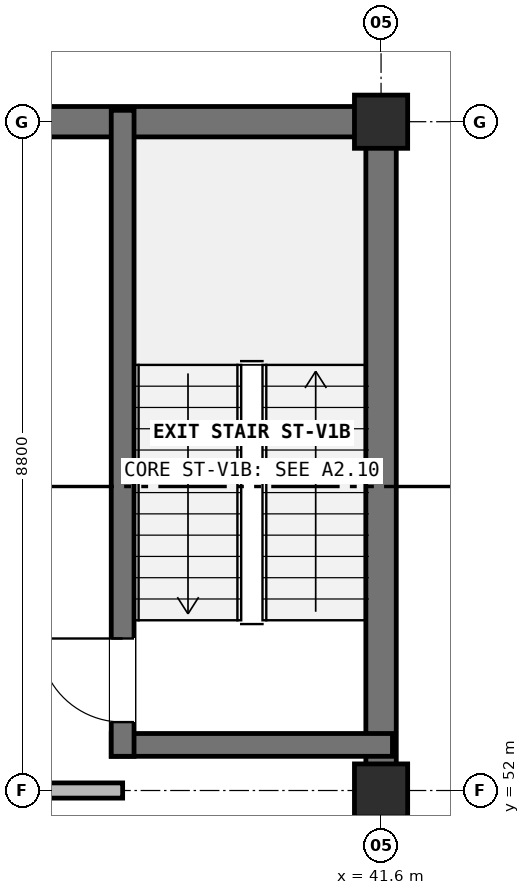
"""IFC4 building model, lengths in metres.
Left out: names, types, materials, properties, quantities, classifications, styles, units other than length and angle.
Written with IfcOpenShell. Run it as: python <this file> out.ifc"""

import sys

from ifc_helpers import new_model, si_unit, direction, frame, frame_2d, origin, origin_2d, place, context, subcontext, project, spatial, rectangle, extrude, element, fill, save


model = new_model("IFC4")
c1 = context("Model", 3, precision=1e-05, world=origin(), true_north=direction((0.0, 1.0)))
c2 = subcontext(c1, "Body", "Model", "MODEL_VIEW")
j1 = project(units=[si_unit("LENGTHUNIT", "METRE"), si_unit("PLANEANGLEUNIT", "RADIAN")], contexts=[c1])
p1 = place(None, origin())
s1 = spatial("IfcSite", under=j1, at=p1, CompositionType="ELEMENT")
p2 = place(p1, origin())
s2 = spatial("IfcBuilding", under=s1, at=p2, CompositionType="ELEMENT")
p3 = place(p2, frame((0.0, 0.0, -4.5)))
s3 = spatial("IfcBuildingStorey", under=s2, at=p3, CompositionType="ELEMENT", Elevation=-4.5)
for number, where, z_axis, x_axis in (
    (1, (41.6, 52.0, 0.0), (0.0, 0.0, 1.0), (1.0, 0.0, 0.0)),
    (2, (41.6, 60.8, 0.0), (0.0, 0.0, 1.0), (1.0, 0.0, 0.0)),
):
    element("IfcColumn", number, at=place(p3, frame(where, z_axis=z_axis, x_axis=x_axis)), inside=s3, PredefinedType="COLUMN", context=c2, shape_type="SweptSolid", body=[
        extrude(rectangle(XDim=0.7, YDim=0.7, at=origin_2d()), origin(), (0.0, 0.0, 1.0), 4.5),
    ])
p4 = place(p3, frame((41.6, 16.6, 0.0), z_axis=(0.0, 0.0, 1.0), x_axis=(0.0, 1.0, 0.0)))
e3 = element("IfcWall", 3, at=p4, inside=s3, PredefinedType="USERDEFINED", context=c2, shape_type="SweptSolid", body=[
    extrude(rectangle(XDim=44.4, YDim=0.4, at=frame_2d((22.2, 0.0))), origin(), (0.0, 0.0, 1.0), 4.5),
])
p5 = place(p3, frame((41.8, 60.8, 0.0), z_axis=(0.0, 0.0, 1.0), x_axis=(-1.0, 0.0, 0.0)))
e4 = element("IfcWall", 4, at=p5, inside=s3, PredefinedType="USERDEFINED", context=c2, shape_type="SweptSolid", body=[
    extrude(rectangle(XDim=34.0, YDim=0.4, at=frame_2d((17.0, 0.0))), origin(), (0.0, 0.0, 1.0), 4.5),
])
p6 = place(p3, frame((38.05, 52.6, 0.0), z_axis=(0.0, 0.0, 1.0), x_axis=(1.0, 0.0, 0.0)))
e5 = element("IfcWall", 5, at=p6, inside=s3, PredefinedType="SHEAR", context=c2, shape_type="SweptSolid", body=[
    extrude(rectangle(XDim=3.7, YDim=0.3, at=frame_2d((1.85, 0.0))), origin(), (0.0, 0.0, 1.0), 4.5),
])
p7 = place(p3, frame((38.2, 52.45, 0.0), z_axis=(0.0, 0.0, 1.0), x_axis=(0.0, 1.0, 0.0)))
e6 = element("IfcWall", 6, at=p7, inside=s3, PredefinedType="SHEAR", context=c2, shape_type="SweptSolid", body=[
    extrude(rectangle(XDim=8.5, YDim=0.3, at=frame_2d((4.25, 0.0))), origin(), (0.0, 0.0, 1.0), 4.5),
])
p8 = place(p7, frame((0.45, 0.0, 0.0)))
e7 = element("IfcOpeningElement", 7, at=p8, cuts=e6, PredefinedType="OPENING", context=c2, shape_type="SweptSolid", body=[
    extrude(rectangle(XDim=1.1, YDim=2.2, at=frame_2d((0.55, 1.1))), frame((0.0, 0.16, 0.0), z_axis=(0.0, -1.0, 0.0), x_axis=(1.0, 0.0, 0.0)), (0.0, 0.0, 1.0), 0.32),
])
p9 = place(p3, frame((11.4, 52.0, 0.0), z_axis=(0.0, 0.0, 1.0), x_axis=(1.0, 0.0, 0.0)))
e8 = element("IfcWall", 8, at=p9, inside=s3, PredefinedType="PARTITIONING", context=c2, shape_type="SweptSolid", body=[
    extrude(rectangle(XDim=26.8, YDim=0.2, at=frame_2d((13.4, 0.0))), origin(), (0.0, 0.0, 1.0), 3.745),
])
p10 = place(p9, frame((11.425, 0.0, 0.0)))
e9 = element("IfcOpeningElement", 9, at=p10, cuts=e8, PredefinedType="OPENING", context=c2, shape_type="SweptSolid", body=[
    extrude(rectangle(XDim=1.15, YDim=2.2, at=frame_2d((0.575, 1.1))), frame((0.0, 0.11, 0.0), z_axis=(0.0, -1.0, 0.0), x_axis=(1.0, 0.0, 0.0)), (0.0, 0.0, 1.0), 0.22),
])
p11 = place(p8, origin())
e10 = element("IfcDoor", 10, at=p11, inside=s3, OperationType="SINGLE_SWING_RIGHT", PredefinedType="DOOR", context=c2, shape_type="SweptSolid", body=[
    extrude(rectangle(XDim=1.1, YDim=2.2, at=frame_2d((0.55, 1.1))), frame((0.0, 0.025, 0.0), z_axis=(0.0, -1.0, 0.0), x_axis=(1.0, 0.0, 0.0)), (0.0, 0.0, 1.0), 0.05),
])
fill(e7, e10)
save(model, sys.argv[1])
